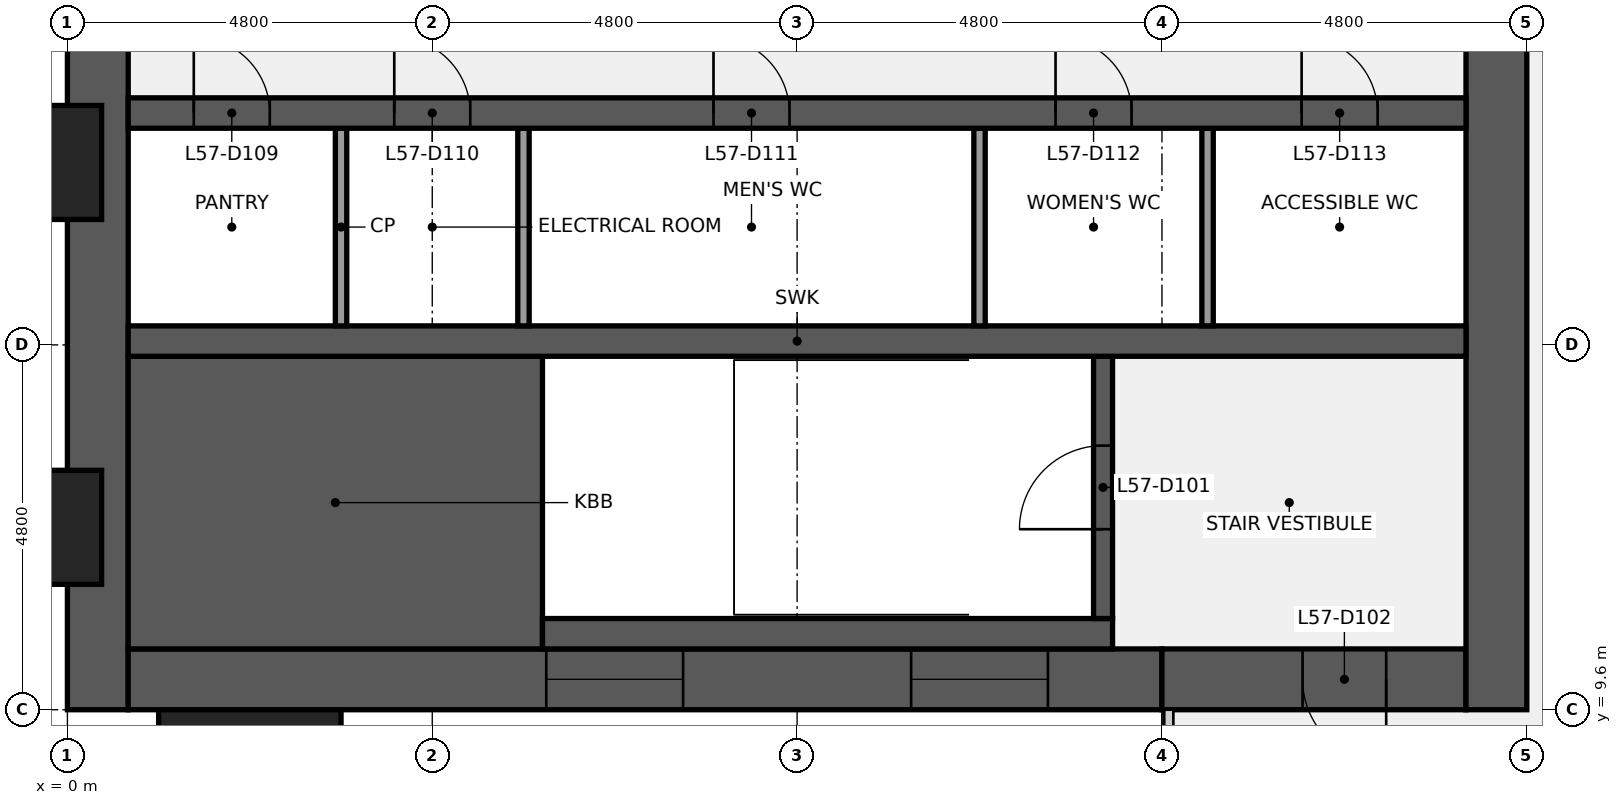
"""IFC4 building model, lengths in metres.
Left out: names, types, materials, properties, quantities, classifications, styles, units other than length and angle.
Written with IfcOpenShell. Run it as: python <this file> out.ifc"""

import sys

from ifc_helpers import new_model, si_unit, direction, frame, frame_2d, origin, origin_2d, place, context, subcontext, project, spatial, rectangle, extrude, element, fill, save


model = new_model("IFC4")
c1 = context("Model", 3, precision=1e-05, world=origin(), true_north=direction((0.0, 1.0)))
c2 = subcontext(c1, "Body", "Model", "MODEL_VIEW")
j1 = project(units=[si_unit("LENGTHUNIT", "METRE"), si_unit("PLANEANGLEUNIT", "RADIAN")], contexts=[c1])
p1 = place(None, origin())
s1 = spatial("IfcSite", under=j1, at=p1, CompositionType="ELEMENT")
p2 = place(p1, origin())
s2 = spatial("IfcBuilding", under=s1, at=p2, CompositionType="ELEMENT")
p3 = place(p2, frame((0.0, 0.0, 257.2)))
s3 = spatial("IfcBuildingStorey", under=s2, at=p3, CompositionType="ELEMENT", Elevation=257.2)
p4 = place(p3, frame((0.4, 9.6, 0.0), z_axis=(0.0, 0.0, 1.0), x_axis=(0.0, 1.0, 0.0)))
e1 = element("IfcWall", 1, at=p4, inside=s3, PredefinedType="SHEAR", context=c2, shape_type="SweptSolid", body=[
    extrude(rectangle(XDim=28.8, YDim=0.8, at=frame_2d((14.4, 0.0))), origin(), (0.0, 0.0, 1.0), 3.84),
])
p5 = place(p4, frame((8.85, 0.0, 0.9)))
e2 = element("IfcOpeningElement", 2, at=p5, cuts=e1, PredefinedType="OPENING", context=c2, shape_type="SweptSolid", body=[
    extrude(rectangle(XDim=1.5, YDim=1.5, at=frame_2d((0.75, 0.75))), frame((0.0, 0.41, 0.0), z_axis=(0.0, -1.0, 0.0), x_axis=(1.0, 0.0, 0.0)), (0.0, 0.0, 1.0), 0.82),
])
p6 = place(p4, frame((18.45, 0.0, 0.9)))
e3 = element("IfcOpeningElement", 3, at=p6, cuts=e1, PredefinedType="OPENING", context=c2, shape_type="SweptSolid", body=[
    extrude(rectangle(XDim=1.5, YDim=1.5, at=frame_2d((0.75, 0.75))), frame((0.0, 0.41, 0.0), z_axis=(0.0, -1.0, 0.0), x_axis=(1.0, 0.0, 0.0)), (0.0, 0.0, 1.0), 0.82),
])
p7 = place(p3, frame((14.4, 10.0, 0.0), z_axis=(0.0, 0.0, 1.0), x_axis=(-1.0, 0.0, 0.0)))
e4 = element("IfcWall", 4, at=p7, inside=s3, PredefinedType="SHEAR", context=c2, shape_type="SweptSolid", body=[
    extrude(rectangle(XDim=13.6, YDim=0.8, at=frame_2d((6.8, 0.0))), origin(), (0.0, 0.0, 1.0), 3.84),
])
p8 = place(p7, frame((6.3, 0.0, 0.9)))
e5 = element("IfcOpeningElement", 5, at=p8, cuts=e4, PredefinedType="OPENING", context=c2, shape_type="SweptSolid", body=[
    extrude(rectangle(XDim=1.8, YDim=1.5, at=frame_2d((0.9, 0.75))), frame((0.0, 0.41, 0.0), z_axis=(0.0, -1.0, 0.0), x_axis=(1.0, 0.0, 0.0)), (0.0, 0.0, 1.0), 0.82),
])
p9 = place(p7, frame((1.5, 0.0, 0.9)))
e6 = element("IfcOpeningElement", 6, at=p9, cuts=e4, PredefinedType="OPENING", context=c2, shape_type="SweptSolid", body=[
    extrude(rectangle(XDim=1.8, YDim=1.5, at=frame_2d((0.9, 0.75))), frame((0.0, 0.41, 0.0), z_axis=(0.0, -1.0, 0.0), x_axis=(1.0, 0.0, 0.0)), (0.0, 0.0, 1.0), 0.82),
])
p10 = place(p3, frame((18.4, 10.0, 0.0), z_axis=(0.0, 0.0, 1.0), x_axis=(-1.0, 0.0, 0.0)))
e7 = element("IfcWall", 7, at=p10, inside=s3, PredefinedType="SHEAR", context=c2, shape_type="SweptSolid", body=[
    extrude(rectangle(XDim=4.0, YDim=0.8, at=frame_2d((2.0, 0.0))), origin(), (0.0, 0.0, 1.0), 3.84),
])
p11 = place(p10, frame((1.05, 0.0, 0.0)))
e8 = element("IfcOpeningElement", 8, at=p11, cuts=e7, PredefinedType="OPENING", context=c2, shape_type="SweptSolid", body=[
    extrude(rectangle(XDim=1.1, YDim=2.1, at=frame_2d((0.55, 1.05))), frame((0.0, 0.41, 0.0), z_axis=(0.0, -1.0, 0.0), x_axis=(1.0, 0.0, 0.0)), (0.0, 0.0, 1.0), 0.82),
])
p12 = place(p3, frame((18.8, 38.4, 0.0), z_axis=(0.0, 0.0, 1.0), x_axis=(0.0, -1.0, 0.0)))
e9 = element("IfcWall", 9, at=p12, inside=s3, PredefinedType="SHEAR", context=c2, shape_type="SweptSolid", body=[
    extrude(rectangle(XDim=28.8, YDim=0.8, at=frame_2d((14.4, 0.0))), origin(), (0.0, 0.0, 1.0), 3.84),
])
p13 = place(p12, frame((18.3, 0.0, 0.0)))
e10 = element("IfcOpeningElement", 10, at=p13, cuts=e9, PredefinedType="OPENING", context=c2, shape_type="SweptSolid", body=[
    extrude(rectangle(XDim=1.8, YDim=2.1, at=frame_2d((0.9, 1.05))), frame((0.0, 0.41, 0.0), z_axis=(0.0, -1.0, 0.0), x_axis=(1.0, 0.0, 0.0)), (0.0, 0.0, 1.0), 0.82),
])
p14 = place(p12, frame((8.7, 0.0, 0.0)))
e11 = element("IfcOpeningElement", 11, at=p14, cuts=e9, PredefinedType="OPENING", context=c2, shape_type="SweptSolid", body=[
    extrude(rectangle(XDim=1.8, YDim=2.1, at=frame_2d((0.9, 1.05))), frame((0.0, 0.41, 0.0), z_axis=(0.0, -1.0, 0.0), x_axis=(1.0, 0.0, 0.0)), (0.0, 0.0, 1.0), 0.82),
])
p15 = place(p3, frame((0.8, 12.325, 0.0), z_axis=(0.0, 0.0, 1.0), x_axis=(1.0, 0.0, 0.0)))
e12 = element("IfcWall", 12, at=p15, inside=s3, PredefinedType="SHEAR", context=c2, shape_type="SweptSolid", body=[
    extrude(rectangle(XDim=5.45, YDim=3.85, at=frame_2d((2.725, 0.0))), origin(), (0.0, 0.0, 1.0), 3.84),
])
p16 = place(p3, frame((6.25, 10.6, 0.0), z_axis=(0.0, 0.0, 1.0), x_axis=(1.0, 0.0, 0.0)))
e13 = element("IfcWall", 13, at=p16, inside=s3, PredefinedType="SHEAR", context=c2, shape_type="SweptSolid", body=[
    extrude(rectangle(XDim=7.5, YDim=0.4, at=frame_2d((3.75, 0.0))), origin(), (0.0, 0.0, 1.0), 3.84),
])
p17 = place(p3, frame((13.625, 10.8, 0.0), z_axis=(0.0, 0.0, 1.0), x_axis=(0.0, 1.0, 0.0)))
e14 = element("IfcWall", 14, at=p17, inside=s3, PredefinedType="SHEAR", context=c2, shape_type="SweptSolid", body=[
    extrude(rectangle(XDim=3.45, YDim=0.25, at=frame_2d((1.725, 0.0))), origin(), (0.0, 0.0, 1.0), 3.84),
])
p18 = place(p17, frame((1.175, 0.0, 0.0)))
e15 = element("IfcOpeningElement", 15, at=p18, cuts=e14, PredefinedType="OPENING", context=c2, shape_type="SweptSolid", body=[
    extrude(rectangle(XDim=1.1, YDim=2.1, at=frame_2d((0.55, 1.05))), frame((0.0, 0.135, 0.0), z_axis=(0.0, -1.0, 0.0), x_axis=(1.0, 0.0, 0.0)), (0.0, 0.0, 1.0), 0.27),
])
p19 = place(p3, frame((0.8, 14.45, 0.0), z_axis=(0.0, 0.0, 1.0), x_axis=(1.0, 0.0, 0.0)))
e16 = element("IfcWall", 16, at=p19, inside=s3, PredefinedType="SHEAR", context=c2, shape_type="SweptSolid", body=[
    extrude(rectangle(XDim=17.6, YDim=0.4, at=frame_2d((8.8, 0.0))), origin(), (0.0, 0.0, 1.0), 3.84),
])
for number, where, z_axis, x_axis in (
    (17, (3.6, 14.65, 0.0), (0.0, 0.0, 1.0), (0.0, 1.0, 0.0)),
    (18, (6.0, 14.65, 0.0), (0.0, 0.0, 1.0), (0.0, 1.0, 0.0)),
    (19, (12.0, 14.65, 0.0), (0.0, 0.0, 1.0), (0.0, 1.0, 0.0)),
    (20, (15.0, 14.65, 0.0), (0.0, 0.0, 1.0), (0.0, 1.0, 0.0)),
):
    element("IfcWall", number, at=place(p3, frame(where, z_axis=z_axis, x_axis=x_axis)), inside=s3, PredefinedType="PARTITIONING", context=c2, shape_type="SweptSolid", body=[
        extrude(rectangle(XDim=2.6, YDim=0.15, at=frame_2d((1.3, 0.0))), origin(), (0.0, 0.0, 1.0), 3.84),
    ])
p20 = place(p3, frame((0.8, 17.45, 0.0), z_axis=(0.0, 0.0, 1.0), x_axis=(1.0, 0.0, 0.0)))
e21 = element("IfcWall", 21, at=p20, inside=s3, PredefinedType="SHEAR", context=c2, shape_type="SweptSolid", body=[
    extrude(rectangle(XDim=17.6, YDim=0.4, at=frame_2d((8.8, 0.0))), origin(), (0.0, 0.0, 1.0), 3.84),
])
p21 = place(p20, frame((0.863, 0.0, 0.0)))
e22 = element("IfcOpeningElement", 22, at=p21, cuts=e21, PredefinedType="OPENING", context=c2, shape_type="SweptSolid", body=[
    extrude(rectangle(XDim=1.0, YDim=2.1, at=frame_2d((0.5, 1.05))), frame((0.0, 0.21, 0.0), z_axis=(0.0, -1.0, 0.0), x_axis=(1.0, 0.0, 0.0)), (0.0, 0.0, 1.0), 0.42),
])
p22 = place(p20, frame((3.5, 0.0, 0.0)))
e23 = element("IfcOpeningElement", 23, at=p22, cuts=e21, PredefinedType="OPENING", context=c2, shape_type="SweptSolid", body=[
    extrude(rectangle(XDim=1.0, YDim=2.1, at=frame_2d((0.5, 1.05))), frame((0.0, 0.21, 0.0), z_axis=(0.0, -1.0, 0.0), x_axis=(1.0, 0.0, 0.0)), (0.0, 0.0, 1.0), 0.42),
])
p23 = place(p20, frame((7.7, 0.0, 0.0)))
e24 = element("IfcOpeningElement", 24, at=p23, cuts=e21, PredefinedType="OPENING", context=c2, shape_type="SweptSolid", body=[
    extrude(rectangle(XDim=1.0, YDim=2.1, at=frame_2d((0.5, 1.05))), frame((0.0, 0.21, 0.0), z_axis=(0.0, -1.0, 0.0), x_axis=(1.0, 0.0, 0.0)), (0.0, 0.0, 1.0), 0.42),
])
p24 = place(p20, frame((12.2, 0.0, 0.0)))
e25 = element("IfcOpeningElement", 25, at=p24, cuts=e21, PredefinedType="OPENING", context=c2, shape_type="SweptSolid", body=[
    extrude(rectangle(XDim=1.0, YDim=2.1, at=frame_2d((0.5, 1.05))), frame((0.0, 0.21, 0.0), z_axis=(0.0, -1.0, 0.0), x_axis=(1.0, 0.0, 0.0)), (0.0, 0.0, 1.0), 0.42),
])
p25 = place(p20, frame((15.438, 0.0, 0.0)))
e26 = element("IfcOpeningElement", 26, at=p25, cuts=e21, PredefinedType="OPENING", context=c2, shape_type="SweptSolid", body=[
    extrude(rectangle(XDim=1.0, YDim=2.1, at=frame_2d((0.5, 1.05))), frame((0.0, 0.21, 0.0), z_axis=(0.0, -1.0, 0.0), x_axis=(1.0, 0.0, 0.0)), (0.0, 0.0, 1.0), 0.42),
])
for number, where, z_axis, x_axis in (
    (27, (-0.75, 12.0, 0.0), (0.0, 0.0, 1.0), (0.0, 1.0, 0.0)),
    (28, (-0.75, 16.8, 0.0), (0.0, 0.0, 1.0), (0.0, 1.0, 0.0)),
    (29, (2.4, 8.85, 0.0), (0.0, 0.0, 1.0), (1.0, 0.0, 0.0)),
):
    element("IfcColumn", number, at=place(p3, frame(where, z_axis=z_axis, x_axis=x_axis)), inside=s3, PredefinedType="PILASTER", context=c2, shape_type="SweptSolid", body=[
        extrude(rectangle(XDim=2.4, YDim=1.5, at=origin_2d()), origin(), (0.0, 0.0, 1.0), 4.0),
    ])
p26 = place(p18, origin())
e30 = element("IfcDoor", 30, at=p26, inside=s3, OperationType="SINGLE_SWING_LEFT", PredefinedType="DOOR", context=c2, shape_type="SweptSolid", body=[
    extrude(rectangle(XDim=1.1, YDim=2.1, at=frame_2d((0.55, 1.05))), frame((0.0, 0.025, 0.0), z_axis=(0.0, -1.0, 0.0), x_axis=(1.0, 0.0, 0.0)), (0.0, 0.0, 1.0), 0.05),
])
fill(e15, e30)
p27 = place(p11, origin())
e31 = element("IfcDoor", 31, at=p27, inside=s3, OperationType="SINGLE_SWING_LEFT", PredefinedType="DOOR", context=c2, shape_type="SweptSolid", body=[
    extrude(rectangle(XDim=1.1, YDim=2.1, at=frame_2d((0.55, 1.05))), frame((0.0, 0.025, 0.0), z_axis=(0.0, -1.0, 0.0), x_axis=(1.0, 0.0, 0.0)), (0.0, 0.0, 1.0), 0.05),
])
fill(e8, e31)
p28 = place(p21, origin())
e32 = element("IfcDoor", 32, at=p28, inside=s3, OperationType="SINGLE_SWING_LEFT", PredefinedType="DOOR", context=c2, shape_type="SweptSolid", body=[
    extrude(rectangle(XDim=1.0, YDim=2.1, at=frame_2d((0.5, 1.05))), frame((0.0, 0.025, 0.0), z_axis=(0.0, -1.0, 0.0), x_axis=(1.0, 0.0, 0.0)), (0.0, 0.0, 1.0), 0.05),
])
fill(e22, e32)
p29 = place(p22, origin())
e33 = element("IfcDoor", 33, at=p29, inside=s3, OperationType="SINGLE_SWING_LEFT", PredefinedType="DOOR", context=c2, shape_type="SweptSolid", body=[
    extrude(rectangle(XDim=1.0, YDim=2.1, at=frame_2d((0.5, 1.05))), frame((0.0, 0.025, 0.0), z_axis=(0.0, -1.0, 0.0), x_axis=(1.0, 0.0, 0.0)), (0.0, 0.0, 1.0), 0.05),
])
fill(e23, e33)
p30 = place(p23, origin())
e34 = element("IfcDoor", 34, at=p30, inside=s3, OperationType="SINGLE_SWING_LEFT", PredefinedType="DOOR", context=c2, shape_type="SweptSolid", body=[
    extrude(rectangle(XDim=1.0, YDim=2.1, at=frame_2d((0.5, 1.05))), frame((0.0, 0.025, 0.0), z_axis=(0.0, -1.0, 0.0), x_axis=(1.0, 0.0, 0.0)), (0.0, 0.0, 1.0), 0.05),
])
fill(e24, e34)
p31 = place(p24, origin())
e35 = element("IfcDoor", 35, at=p31, inside=s3, OperationType="SINGLE_SWING_LEFT", PredefinedType="DOOR", context=c2, shape_type="SweptSolid", body=[
    extrude(rectangle(XDim=1.0, YDim=2.1, at=frame_2d((0.5, 1.05))), frame((0.0, 0.025, 0.0), z_axis=(0.0, -1.0, 0.0), x_axis=(1.0, 0.0, 0.0)), (0.0, 0.0, 1.0), 0.05),
])
fill(e25, e35)
p32 = place(p25, origin())
e36 = element("IfcDoor", 36, at=p32, inside=s3, OperationType="SINGLE_SWING_LEFT", PredefinedType="DOOR", context=c2, shape_type="SweptSolid", body=[
    extrude(rectangle(XDim=1.0, YDim=2.1, at=frame_2d((0.5, 1.05))), frame((0.0, 0.025, 0.0), z_axis=(0.0, -1.0, 0.0), x_axis=(1.0, 0.0, 0.0)), (0.0, 0.0, 1.0), 0.05),
])
fill(e26, e36)
p33 = place(p8, origin())
e37 = element("IfcWindow", 37, at=p33, inside=s3, PartitioningType="SINGLE_PANEL", PredefinedType="WINDOW", context=c2, shape_type="SweptSolid", body=[
    extrude(rectangle(XDim=1.8, YDim=1.5, at=frame_2d((0.9, 0.75))), frame((0.0, 0.03, 0.0), z_axis=(0.0, -1.0, 0.0), x_axis=(1.0, 0.0, 0.0)), (0.0, 0.0, 1.0), 0.06),
])
fill(e5, e37)
p34 = place(p9, origin())
e38 = element("IfcWindow", 38, at=p34, inside=s3, PartitioningType="SINGLE_PANEL", PredefinedType="WINDOW", context=c2, shape_type="SweptSolid", body=[
    extrude(rectangle(XDim=1.8, YDim=1.5, at=frame_2d((0.9, 0.75))), frame((0.0, 0.03, 0.0), z_axis=(0.0, -1.0, 0.0), x_axis=(1.0, 0.0, 0.0)), (0.0, 0.0, 1.0), 0.06),
])
fill(e6, e38)
save(model, sys.argv[1])
